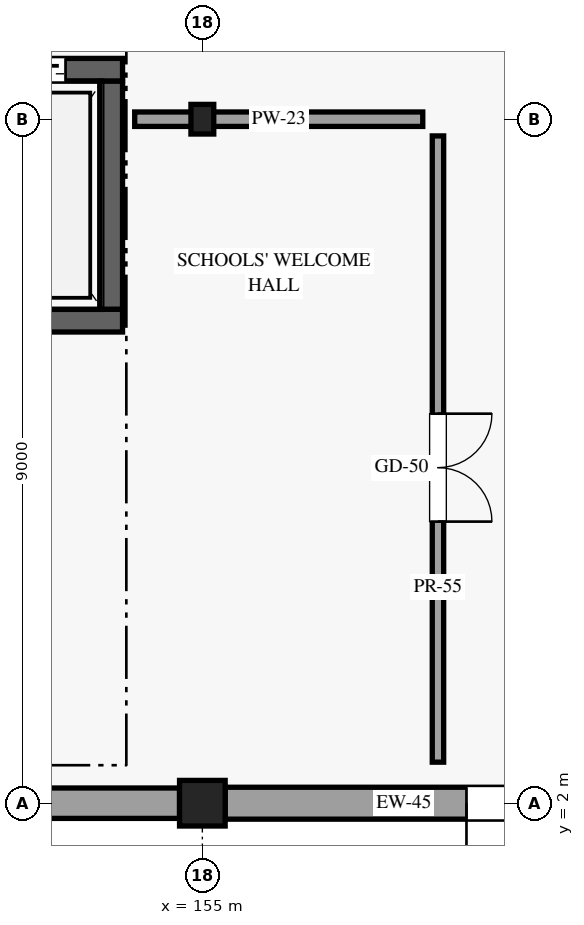
"""IFC4 building model, lengths in metres.
Left out: names, types, materials, properties, quantities, classifications, styles, units other than length and angle.
Written with IfcOpenShell. Run it as: python <this file> out.ifc"""

import sys

from ifc_helpers import new_model, si_unit, direction, frame, frame_2d, origin, origin_2d, place, context, subcontext, project, spatial, rectangle, i_section, extrude, element, fill, save


model = new_model("IFC4")
c1 = context("Model", 3, precision=1e-05, world=origin(), true_north=direction((0.0, 1.0)))
c2 = subcontext(c1, "Body", "Model", "MODEL_VIEW")
j1 = project(units=[si_unit("LENGTHUNIT", "METRE"), si_unit("PLANEANGLEUNIT", "RADIAN")], contexts=[c1])
p1 = place(None, origin())
s1 = spatial("IfcSite", under=j1, at=p1, CompositionType="ELEMENT")
p2 = place(p1, origin())
s2 = spatial("IfcBuilding", under=s1, at=p2, CompositionType="ELEMENT")
p3 = place(p2, origin())
s3 = spatial("IfcBuildingStorey", under=s2, at=p3, CompositionType="ELEMENT", Elevation=0.0)
p4 = place(p3, frame((155.0, 2.0, 0.0), z_axis=(0.0, 0.0, 1.0), x_axis=(1.0, 0.0, 0.0)))
e1 = element("IfcColumn", 1, at=p4, inside=s3, PredefinedType="COLUMN", context=c2, shape_type="SweptSolid", body=[
    extrude(rectangle(XDim=0.6, YDim=0.6, at=origin_2d()), origin(), (0.0, 0.0, 1.0), 5.4),
])
p5 = place(p3, frame((155.0, 11.0, 0.0), z_axis=(0.0, 0.0, 1.0), x_axis=(1.0, 0.0, 0.0)))
e2 = element("IfcColumn", 2, at=p5, inside=s3, PredefinedType="COLUMN", context=c2, shape_type="SweptSolid", body=[
    extrude(i_section(OverallWidth=0.3, OverallDepth=0.39, WebThickness=0.011, FlangeThickness=0.019, FilletRadius=0.027, at=origin_2d()), origin(), (0.0, 0.0, 1.0), 5.4),
])
p6 = place(p3, frame((146.3, 2.0, 0.0), z_axis=(0.0, 0.0, 1.0), x_axis=(1.0, 0.0, 0.0)))
e3 = element("IfcWall", 3, at=p6, inside=s3, PredefinedType="STANDARD", context=c2, shape_type="SweptSolid", body=[
    extrude(rectangle(XDim=8.4, YDim=0.4, at=frame_2d((4.2, 0.0))), origin(), (0.0, 0.0, 1.0), 4.555),
])
p7 = place(p6, frame((5.25, 0.0, 0.0), z_axis=(0.0, 0.0, 1.0), x_axis=(-1.0, 0.0, 0.0)))
e4 = element("IfcOpeningElement", 4, at=p7, cuts=e3, PredefinedType="OPENING", context=c2, shape_type="SweptSolid", body=[
    extrude(rectangle(XDim=2.1, YDim=2.45, at=frame_2d((1.05, 1.225))), frame((0.0, 0.21, 0.0), z_axis=(0.0, -1.0, 0.0), x_axis=(1.0, 0.0, 0.0)), (0.0, 0.0, 1.0), 0.42),
])
p8 = place(p3, frame((155.3, 2.0, 0.0), z_axis=(0.0, 0.0, 1.0), x_axis=(1.0, 0.0, 0.0)))
e5 = element("IfcWall", 5, at=p8, inside=s3, PredefinedType="STANDARD", context=c2, shape_type="SweptSolid", body=[
    extrude(rectangle(XDim=8.4, YDim=0.42, at=frame_2d((4.2, 0.0))), origin(), (0.0, 0.0, 1.0), 4.555),
])
p9 = place(p8, frame((5.225, 0.0, 0.0), z_axis=(0.0, 0.0, 1.0), x_axis=(-1.0, 0.0, 0.0)))
e6 = element("IfcOpeningElement", 6, at=p9, cuts=e5, PredefinedType="OPENING", context=c2, shape_type="SweptSolid", body=[
    extrude(rectangle(XDim=2.05, YDim=2.45, at=frame_2d((1.025, 1.225))), frame((0.0, 0.22, 0.0), z_axis=(0.0, -1.0, 0.0), x_axis=(1.0, 0.0, 0.0)), (0.0, 0.0, 1.0), 0.44),
])
p10 = place(p3, frame((151.35, 11.65, 0.0), z_axis=(0.0, 0.0, 1.0), x_axis=(1.0, 0.0, 0.0)))
e7 = element("IfcWall", 7, at=p10, inside=s3, PredefinedType="SHEAR", context=c2, shape_type="SweptSolid", body=[
    extrude(rectangle(XDim=2.6, YDim=0.3, at=frame_2d((1.3, 0.0))), origin(), (0.0, 0.0, 1.0), 5.16),
])
p11 = place(p10, frame((0.75, 0.0, 0.0)))
e8 = element("IfcOpeningElement", 8, at=p11, cuts=e7, PredefinedType="OPENING", context=c2, shape_type="SweptSolid", body=[
    extrude(rectangle(XDim=1.1, YDim=2.2, at=frame_2d((0.55, 1.1))), frame((0.0, 0.16, 0.0), z_axis=(0.0, -1.0, 0.0), x_axis=(1.0, 0.0, 0.0)), (0.0, 0.0, 1.0), 0.32),
])
p12 = place(p3, frame((151.35, 8.35, 0.0), z_axis=(0.0, 0.0, 1.0), x_axis=(1.0, 0.0, 0.0)))
e9 = element("IfcWall", 9, at=p12, inside=s3, PredefinedType="SHEAR", context=c2, shape_type="SweptSolid", body=[
    extrude(rectangle(XDim=2.6, YDim=0.3, at=frame_2d((1.3, 0.0))), origin(), (0.0, 0.0, 1.0), 5.16),
])
p13 = place(p3, frame((153.8, 8.5, 0.0), z_axis=(0.0, 0.0, 1.0), x_axis=(0.0, 1.0, 0.0)))
e10 = element("IfcWall", 10, at=p13, inside=s3, PredefinedType="SHEAR", context=c2, shape_type="SweptSolid", body=[
    extrude(rectangle(XDim=3.0, YDim=0.3, at=frame_2d((1.5, 0.0))), origin(), (0.0, 0.0, 1.0), 5.16),
])
p14 = place(p3, frame((158.1, 2.54, 0.0), z_axis=(0.0, 0.0, 1.0), x_axis=(0.0, 1.0, 0.0)))
e11 = element("IfcWall", 11, at=p14, inside=s3, PredefinedType="PARTITIONING", context=c2, shape_type="SweptSolid", body=[
    extrude(rectangle(XDim=8.24, YDim=0.15, at=frame_2d((4.12, 0.0))), origin(), (0.0, 0.0, 1.0), 4.555),
])
p15 = place(p14, frame((4.585, 0.0, 0.0), z_axis=(0.0, 0.0, 1.0), x_axis=(-1.0, 0.0, 0.0)))
e12 = element("IfcOpeningElement", 12, at=p15, cuts=e11, PredefinedType="OPENING", context=c2, shape_type="SweptSolid", body=[
    extrude(rectangle(XDim=1.42, YDim=2.3, at=frame_2d((0.71, 1.15))), frame((0.0, 0.085, 0.0), z_axis=(0.0, -1.0, 0.0), x_axis=(1.0, 0.0, 0.0)), (0.0, 0.0, 1.0), 0.17),
])
p16 = place(p3, frame((154.11, 11.0, 0.0), z_axis=(0.0, 0.0, 1.0), x_axis=(1.0, 0.0, 0.0)))
e13 = element("IfcWall", 13, at=p16, inside=s3, PredefinedType="PARTITIONING", context=c2, shape_type="SweptSolid", body=[
    extrude(rectangle(XDim=3.79, YDim=0.19, at=frame_2d((1.895, 0.0))), origin(), (0.0, 0.0, 1.0), 4.555),
])
p17 = place(p9, origin())
e14 = element("IfcDoor", 14, at=p17, inside=s3, OperationType="DOUBLE_DOOR_SINGLE_SWING", PredefinedType="DOOR", context=c2, shape_type="SweptSolid", body=[
    extrude(rectangle(XDim=2.05, YDim=2.45, at=frame_2d((1.025, 1.225))), frame((0.0, 0.025, 0.0), z_axis=(0.0, -1.0, 0.0), x_axis=(1.0, 0.0, 0.0)), (0.0, 0.0, 1.0), 0.05),
])
fill(e6, e14)
p18 = place(p11, origin())
e15 = element("IfcDoor", 15, at=p18, inside=s3, OperationType="SLIDING_TO_LEFT", PredefinedType="DOOR", context=c2, shape_type="SweptSolid", body=[
    extrude(rectangle(XDim=1.1, YDim=2.2, at=frame_2d((0.55, 1.1))), frame((0.0, 0.025, 0.0), z_axis=(0.0, -1.0, 0.0), x_axis=(1.0, 0.0, 0.0)), (0.0, 0.0, 1.0), 0.05),
])
fill(e8, e15)
p19 = place(p15, origin())
e16 = element("IfcDoor", 16, at=p19, inside=s3, OperationType="DOUBLE_DOOR_SINGLE_SWING", PredefinedType="DOOR", context=c2, shape_type="SweptSolid", body=[
    extrude(rectangle(XDim=1.42, YDim=2.3, at=frame_2d((0.71, 1.15))), frame((0.0, 0.025, 0.0), z_axis=(0.0, -1.0, 0.0), x_axis=(1.0, 0.0, 0.0)), (0.0, 0.0, 1.0), 0.05),
])
fill(e12, e16)
save(model, sys.argv[1])
